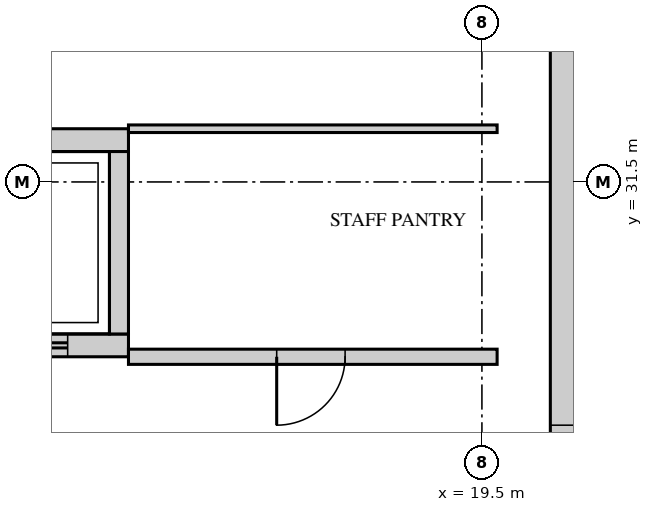
"""IFC4 building model, lengths in metres.
Left out: names, types, materials, properties, quantities, classifications, styles, units other than length and angle.
Written with IfcOpenShell. Run it as: python <this file> out.ifc"""

import sys

from ifc_helpers import new_model, si_unit, direction, frame, frame_2d, origin, place, context, subcontext, project, spatial, rectangle, extrude, source, transform, mapped, element, fill, save


model = new_model("IFC4")
c1 = context("Model", 3, precision=1e-05, world=origin(), true_north=direction((0.0, 1.0)))
c2 = subcontext(c1, "Body", "Model", "MODEL_VIEW")
j1 = project(units=[si_unit("LENGTHUNIT", "METRE"), si_unit("PLANEANGLEUNIT", "RADIAN")], contexts=[c1])
p1 = place(None, origin())
s1 = spatial("IfcSite", under=j1, at=p1, CompositionType="ELEMENT")
p2 = place(p1, origin())
s2 = spatial("IfcBuilding", under=s1, at=p2, CompositionType="ELEMENT")
p3 = place(p2, frame((0.0, 0.0, 306.2)))
s3 = spatial("IfcBuildingStorey", under=s2, at=p3, CompositionType="ELEMENT", Elevation=306.2)
m1 = source(origin(), c2, "Body", "SweptSolid", [
    extrude(rectangle(XDim=22.8, YDim=0.6, at=frame_2d((11.4, 0.0))), origin(), (0.0, 0.0, 1.0), 3.75),
])
p4 = place(p3, frame((20.7, 15.6, 0.0), z_axis=(0.0, 0.0, 1.0), x_axis=(0.0, 1.0, 0.0)))
e1 = element("IfcWall", 1, at=p4, inside=s3, PredefinedType="SHEAR", context=c2, shape_type="MappedRepresentation", body=[
    mapped(m1, transform((0.0, 0.0, 0.0))),
])
m2 = source(origin(), c2, "Body", "SweptSolid", [
    extrude(rectangle(XDim=1.8, YDim=2.1, at=frame_2d((0.9, 1.05))), frame((0.0, 0.31, 0.0), z_axis=(0.0, -1.0, 0.0), x_axis=(1.0, 0.0, 0.0)), (0.0, 0.0, 1.0), 0.62),
])
p5 = place(p4, frame((10.9, 0.0, 0.0)))
e2 = element("IfcOpeningElement", 2, at=p5, cuts=e1, PredefinedType="OPENING", context=c2, shape_type="MappedRepresentation", body=[
    mapped(m2, transform((0.0, 0.0, 0.0))),
])
m3 = source(origin(), c2, "Body", "SweptSolid", [
    extrude(rectangle(XDim=0.9, YDim=2.1, at=frame_2d((0.45, 1.05))), frame((0.0, 0.31, 0.0), z_axis=(0.0, -1.0, 0.0), x_axis=(1.0, 0.0, 0.0)), (0.0, 0.0, 1.0), 0.62),
])
p6 = place(p4, frame((0.55, 0.0, 0.0)))
e3 = element("IfcOpeningElement", 3, at=p6, cuts=e1, PredefinedType="OPENING", context=c2, shape_type="MappedRepresentation", body=[
    mapped(m3, transform((0.0, 0.0, 0.0))),
])
p7 = place(p4, frame((3.0, 0.0, 0.0)))
e4 = element("IfcOpeningElement", 4, at=p7, cuts=e1, PredefinedType="OPENING", context=c2, shape_type="MappedRepresentation", body=[
    mapped(m3, transform((0.0, 0.0, 0.0))),
])
p8 = place(p4, frame((5.75, 0.0, 0.0)))
e5 = element("IfcOpeningElement", 5, at=p8, cuts=e1, PredefinedType="OPENING", context=c2, shape_type="MappedRepresentation", body=[
    mapped(m3, transform((0.0, 0.0, 0.0))),
])
m4 = source(origin(), c2, "Body", "SweptSolid", [
    extrude(rectangle(XDim=7.65, YDim=0.3, at=frame_2d((3.825, 0.0))), origin(), (0.0, 0.0, 1.0), 3.75),
])
p9 = place(p3, frame((7.2, 32.05, 0.0), z_axis=(0.0, 0.0, 1.0), x_axis=(1.0, 0.0, 0.0)))
e6 = element("IfcWall", 6, at=p9, inside=s3, PredefinedType="STANDARD", context=c2, shape_type="MappedRepresentation", body=[
    mapped(m4, transform((0.0, 0.0, 0.0))),
])
p10 = place(p3, frame((7.2, 29.35, 0.0), z_axis=(0.0, 0.0, 1.0), x_axis=(1.0, 0.0, 0.0)))
e7 = element("IfcWall", 7, at=p10, inside=s3, PredefinedType="STANDARD", context=c2, shape_type="MappedRepresentation", body=[
    mapped(m4, transform((0.0, 0.0, 0.0))),
])
m5 = source(origin(), c2, "Body", "SweptSolid", [
    extrude(rectangle(XDim=1.2, YDim=2.1, at=frame_2d((0.6, 1.05))), frame((0.0, 0.16, 0.0), z_axis=(0.0, -1.0, 0.0), x_axis=(1.0, 0.0, 0.0)), (0.0, 0.0, 1.0), 0.32),
])
p11 = place(p10, frame((0.55, 0.0, 0.0)))
e8 = element("IfcOpeningElement", 8, at=p11, cuts=e7, PredefinedType="OPENING", context=c2, shape_type="MappedRepresentation", body=[
    mapped(m5, transform((0.0, 0.0, 0.0))),
])
p12 = place(p10, frame((3.1, 0.0, 0.0)))
e9 = element("IfcOpeningElement", 9, at=p12, cuts=e7, PredefinedType="OPENING", context=c2, shape_type="MappedRepresentation", body=[
    mapped(m5, transform((0.0, 0.0, 0.0))),
])
p13 = place(p10, frame((5.65, 0.0, 0.0)))
e10 = element("IfcOpeningElement", 10, at=p13, cuts=e7, PredefinedType="OPENING", context=c2, shape_type="MappedRepresentation", body=[
    mapped(m5, transform((0.0, 0.0, 0.0))),
])
m6 = source(origin(), c2, "Body", "SweptSolid", [
    extrude(rectangle(XDim=2.4, YDim=0.25, at=frame_2d((1.2, 0.0))), origin(), (0.0, 0.0, 1.0), 3.75),
])
p14 = place(p3, frame((14.725, 29.5, 0.0), z_axis=(0.0, 0.0, 1.0), x_axis=(0.0, 1.0, 0.0)))
e11 = element("IfcWall", 11, at=p14, inside=s3, PredefinedType="STANDARD", context=c2, shape_type="MappedRepresentation", body=[
    mapped(m6, transform((0.0, 0.0, 0.0))),
])
m7 = source(origin(), c2, "Body", "SweptSolid", [
    extrude(rectangle(XDim=4.85, YDim=0.2, at=frame_2d((2.425, 0.0))), origin(), (0.0, 0.0, 1.0), 3.8),
])
p15 = place(p3, frame((14.85, 29.2, 0.0), z_axis=(0.0, 0.0, 1.0), x_axis=(1.0, 0.0, 0.0)))
e12 = element("IfcWall", 12, at=p15, inside=s3, PredefinedType="PARTITIONING", context=c2, shape_type="MappedRepresentation", body=[
    mapped(m7, transform((0.0, 0.0, 0.0))),
])
m8 = source(origin(), c2, "Body", "SweptSolid", [
    extrude(rectangle(XDim=0.9, YDim=2.1, at=frame_2d((0.45, 1.05))), frame((0.0, 0.11, 0.0), z_axis=(0.0, -1.0, 0.0), x_axis=(1.0, 0.0, 0.0)), (0.0, 0.0, 1.0), 0.22),
])
p16 = place(p15, frame((1.95, 0.0, 0.0)))
e13 = element("IfcOpeningElement", 13, at=p16, cuts=e12, PredefinedType="OPENING", context=c2, shape_type="MappedRepresentation", body=[
    mapped(m8, transform((0.0, 0.0, 0.0))),
])
m9 = source(origin(), c2, "Body", "SweptSolid", [
    extrude(rectangle(XDim=4.85, YDim=0.1, at=frame_2d((2.425, 0.0))), origin(), (0.0, 0.0, 1.0), 3.8),
])
p17 = place(p3, frame((14.85, 32.2, 0.0), z_axis=(0.0, 0.0, 1.0), x_axis=(1.0, 0.0, 0.0)))
e14 = element("IfcWall", 14, at=p17, inside=s3, PredefinedType="PARTITIONING", context=c2, shape_type="MappedRepresentation", body=[
    mapped(m9, transform((0.0, 0.0, 0.0))),
])
m10 = source(origin(), c2, "Body", "SweptSolid", [
    extrude(rectangle(XDim=0.9, YDim=2.1, at=frame_2d((0.45, 1.05))), frame((0.0, 0.025, 0.0), z_axis=(0.0, -1.0, 0.0), x_axis=(1.0, 0.0, 0.0)), (0.0, 0.0, 1.0), 0.05),
])
p18 = place(p16, origin())
e15 = element("IfcDoor", 15, at=p18, inside=s3, OperationType="SINGLE_SWING_LEFT", PredefinedType="DOOR", context=c2, shape_type="MappedRepresentation", body=[
    mapped(m10, transform((0.0, 0.0, 0.0))),
])
fill(e13, e15)
m11 = source(origin(), c2, "Body", "SweptSolid", [
    extrude(rectangle(XDim=1.8, YDim=2.1, at=frame_2d((0.9, 1.05))), frame((0.0, 0.25, 0.0), z_axis=(0.0, -1.0, 0.0), x_axis=(1.0, 0.0, 0.0)), (0.0, 0.0, 1.0), 0.5),
])
p19 = place(p5, origin())
e16 = element("IfcDoor", 16, at=p19, inside=s3, OperationType="DOUBLE_DOOR_SINGLE_SWING", PredefinedType="DOOR", context=c2, shape_type="MappedRepresentation", body=[
    mapped(m11, transform((0.0, 0.0, 0.0))),
])
fill(e2, e16)
m12 = source(origin(), c2, "Body", "SweptSolid", [
    extrude(rectangle(XDim=1.2, YDim=2.1, at=frame_2d((0.6, 1.05))), frame((0.0, 0.025, 0.0), z_axis=(0.0, -1.0, 0.0), x_axis=(1.0, 0.0, 0.0)), (0.0, 0.0, 1.0), 0.05),
])
p20 = place(p13, origin())
e17 = element("IfcDoor", 17, at=p20, inside=s3, OperationType="DOUBLE_DOOR_SLIDING", PredefinedType="DOOR", context=c2, shape_type="MappedRepresentation", body=[
    mapped(m12, transform((0.0, 0.0, 0.0))),
])
fill(e10, e17)
save(model, sys.argv[1])
